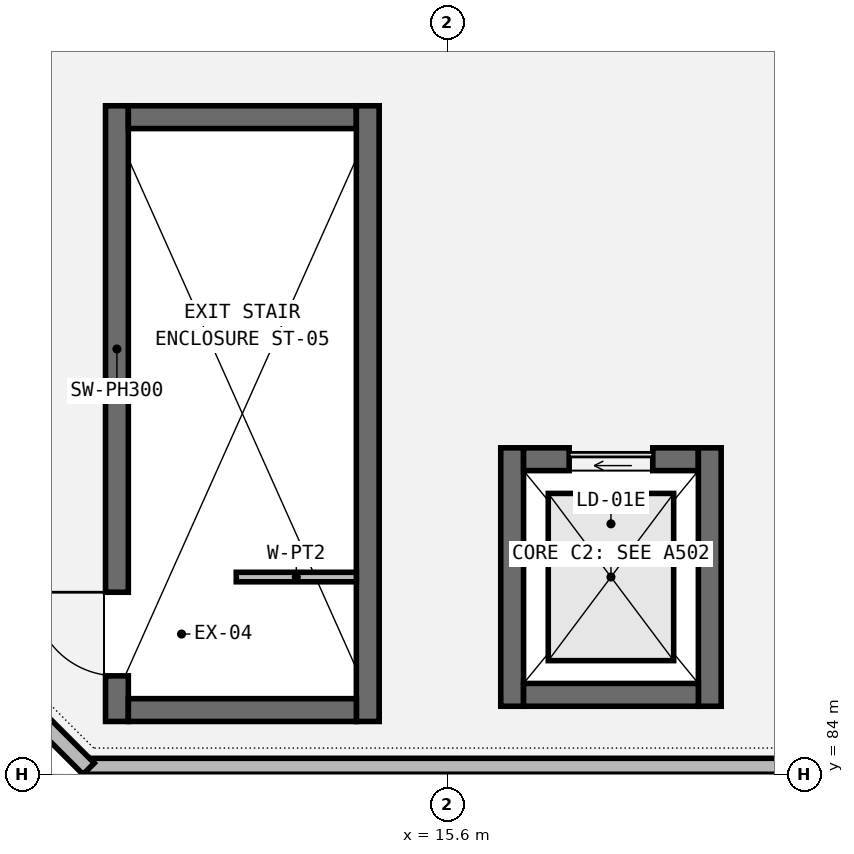
"""IFC4 building model, lengths in metres.
Left out: names, types, materials, properties, quantities, classifications, styles, units other than length and angle.
Written with IfcOpenShell. Run it as: python <this file> out.ifc"""

import sys

from ifc_helpers import new_model, si_unit, direction, frame, frame_2d, origin, place, context, subcontext, project, spatial, rectangle, extrude, element, fill, save


model = new_model("IFC4")
c1 = context("Model", 3, precision=1e-05, world=origin(), true_north=direction((0.0, 1.0)))
c2 = subcontext(c1, "Body", "Model", "MODEL_VIEW")
j1 = project(units=[si_unit("LENGTHUNIT", "METRE"), si_unit("PLANEANGLEUNIT", "RADIAN")], contexts=[c1])
p1 = place(None, origin())
s1 = spatial("IfcSite", under=j1, at=p1, CompositionType="ELEMENT")
p2 = place(p1, origin())
s2 = spatial("IfcBuilding", under=s1, at=p2, CompositionType="ELEMENT")
p3 = place(p2, frame((0.0, 0.0, 28.0)))
s3 = spatial("IfcBuildingStorey", under=s2, at=p3, CompositionType="ELEMENT", Elevation=28.0)
p4 = place(p3, frame((11.25, 84.7, 0.0), z_axis=(0.0, 0.0, 1.0), x_axis=(0.0, 1.0, 0.0)))
e1 = element("IfcWall", 1, at=p4, inside=s3, PredefinedType="SHEAR", context=c2, shape_type="SweptSolid", body=[
    extrude(rectangle(XDim=8.1, YDim=0.3, at=frame_2d((4.05, 0.0))), origin(), (0.0, 0.0, 1.0), 3.2),
])
p5 = place(p4, frame((0.6, 0.0, 0.0)))
e2 = element("IfcOpeningElement", 2, at=p5, cuts=e1, PredefinedType="OPENING", context=c2, shape_type="SweptSolid", body=[
    extrude(rectangle(XDim=1.1, YDim=2.15, at=frame_2d((0.55, 1.075))), frame((0.0, 0.16, 0.0), z_axis=(0.0, -1.0, 0.0), x_axis=(1.0, 0.0, 0.0)), (0.0, 0.0, 1.0), 0.32),
])
p6 = place(p3, frame((11.4, 92.65, 0.0), z_axis=(0.0, 0.0, 1.0), x_axis=(1.0, 0.0, 0.0)))
e3 = element("IfcWall", 3, at=p6, inside=s3, PredefinedType="SHEAR", context=c2, shape_type="SweptSolid", body=[
    extrude(rectangle(XDim=3.0, YDim=0.3, at=frame_2d((1.5, 0.0))), origin(), (0.0, 0.0, 1.0), 3.2),
])
p7 = place(p3, frame((14.55, 92.8, 0.0), z_axis=(0.0, 0.0, 1.0), x_axis=(0.0, -1.0, 0.0)))
e4 = element("IfcWall", 4, at=p7, inside=s3, PredefinedType="SHEAR", context=c2, shape_type="SweptSolid", body=[
    extrude(rectangle(XDim=8.1, YDim=0.3, at=frame_2d((4.05, 0.0))), origin(), (0.0, 0.0, 1.0), 3.2),
])
p8 = place(p3, frame((14.4, 84.85, 0.0), z_axis=(0.0, 0.0, 1.0), x_axis=(-1.0, 0.0, 0.0)))
e5 = element("IfcWall", 5, at=p8, inside=s3, PredefinedType="SHEAR", context=c2, shape_type="SweptSolid", body=[
    extrude(rectangle(XDim=3.0, YDim=0.3, at=frame_2d((1.5, 0.0))), origin(), (0.0, 0.0, 1.0), 3.2),
])
p9 = place(p3, frame((16.45, 84.9, 0.0), z_axis=(0.0, 0.0, 1.0), x_axis=(0.0, 1.0, 0.0)))
e6 = element("IfcWall", 6, at=p9, inside=s3, PredefinedType="SHEAR", context=c2, shape_type="SweptSolid", body=[
    extrude(rectangle(XDim=3.4, YDim=0.3, at=frame_2d((1.7, 0.0))), origin(), (0.0, 0.0, 1.0), 3.2),
])
p10 = place(p3, frame((16.6, 88.15, 0.0), z_axis=(0.0, 0.0, 1.0), x_axis=(1.0, 0.0, 0.0)))
e7 = element("IfcWall", 7, at=p10, inside=s3, PredefinedType="SHEAR", context=c2, shape_type="SweptSolid", body=[
    extrude(rectangle(XDim=2.3, YDim=0.3, at=frame_2d((1.15, 0.0))), origin(), (0.0, 0.0, 1.0), 3.2),
])
p11 = place(p10, frame((0.6, 0.0, 0.0)))
e8 = element("IfcOpeningElement", 8, at=p11, cuts=e7, PredefinedType="OPENING", context=c2, shape_type="SweptSolid", body=[
    extrude(rectangle(XDim=1.1, YDim=2.15, at=frame_2d((0.55, 1.075))), frame((0.0, 0.16, 0.0), z_axis=(0.0, -1.0, 0.0), x_axis=(1.0, 0.0, 0.0)), (0.0, 0.0, 1.0), 0.32),
])
p12 = place(p3, frame((19.05, 88.3, 0.0), z_axis=(0.0, 0.0, 1.0), x_axis=(0.0, -1.0, 0.0)))
e9 = element("IfcWall", 9, at=p12, inside=s3, PredefinedType="SHEAR", context=c2, shape_type="SweptSolid", body=[
    extrude(rectangle(XDim=3.4, YDim=0.3, at=frame_2d((1.7, 0.0))), origin(), (0.0, 0.0, 1.0), 3.2),
])
p13 = place(p3, frame((18.9, 85.05, 0.0), z_axis=(0.0, 0.0, 1.0), x_axis=(-1.0, 0.0, 0.0)))
e10 = element("IfcWall", 10, at=p13, inside=s3, PredefinedType="SHEAR", context=c2, shape_type="SweptSolid", body=[
    extrude(rectangle(XDim=2.3, YDim=0.3, at=frame_2d((1.15, 0.0))), origin(), (0.0, 0.0, 1.0), 3.2),
])
p14 = place(p3, frame((10.8, 84.11, 0.0), z_axis=(0.0, 0.0, 1.0), x_axis=(1.0, 0.0, 0.0)))
e11 = element("IfcWall", 11, at=p14, inside=s3, PredefinedType="PARAPET", context=c2, shape_type="SweptSolid", body=[
    extrude(rectangle(XDim=19.2, YDim=0.21, at=frame_2d((9.6, 0.0))), origin(), (0.0, 0.0, 1.0), 1.2),
])
p15 = place(p3, frame((6.078, 88.878, 0.0), z_axis=(0.0, 0.0, 1.0), x_axis=(0.707106781187, -0.707106781187, 0.0)))
e12 = element("IfcWall", 12, at=p15, inside=s3, PredefinedType="PARAPET", context=c2, shape_type="SweptSolid", body=[
    extrude(rectangle(XDim=6.788, YDim=0.21, at=frame_2d((3.394, 0.0))), origin(), (0.0, 0.0, 1.0), 1.2),
])
p16 = place(p3, frame((14.4, 86.6, 0.0), z_axis=(0.0, 0.0, 1.0), x_axis=(-1.0, 0.0, 0.0)))
e13 = element("IfcWall", 13, at=p16, inside=s3, PredefinedType="PARTITIONING", context=c2, shape_type="SweptSolid", body=[
    extrude(rectangle(XDim=1.58, YDim=0.125, at=frame_2d((0.79, 0.0))), origin(), (0.0, 0.0, 1.0), 1.15),
])
p17 = place(p5, origin())
e14 = element("IfcDoor", 14, at=p17, inside=s3, OperationType="SINGLE_SWING_RIGHT", PredefinedType="DOOR", context=c2, shape_type="SweptSolid", body=[
    extrude(rectangle(XDim=1.1, YDim=2.15, at=frame_2d((0.55, 1.075))), frame((0.0, 0.025, 0.0), z_axis=(0.0, -1.0, 0.0), x_axis=(1.0, 0.0, 0.0)), (0.0, 0.0, 1.0), 0.05),
])
fill(e2, e14)
p18 = place(p11, origin())
e15 = element("IfcDoor", 15, at=p18, inside=s3, OperationType="SLIDING_TO_LEFT", PredefinedType="USERDEFINED", context=c2, shape_type="SweptSolid", body=[
    extrude(rectangle(XDim=1.1, YDim=2.15, at=frame_2d((0.55, 1.075))), frame((0.0, 0.025, 0.0), z_axis=(0.0, -1.0, 0.0), x_axis=(1.0, 0.0, 0.0)), (0.0, 0.0, 1.0), 0.05),
])
fill(e8, e15)
save(model, sys.argv[1])
